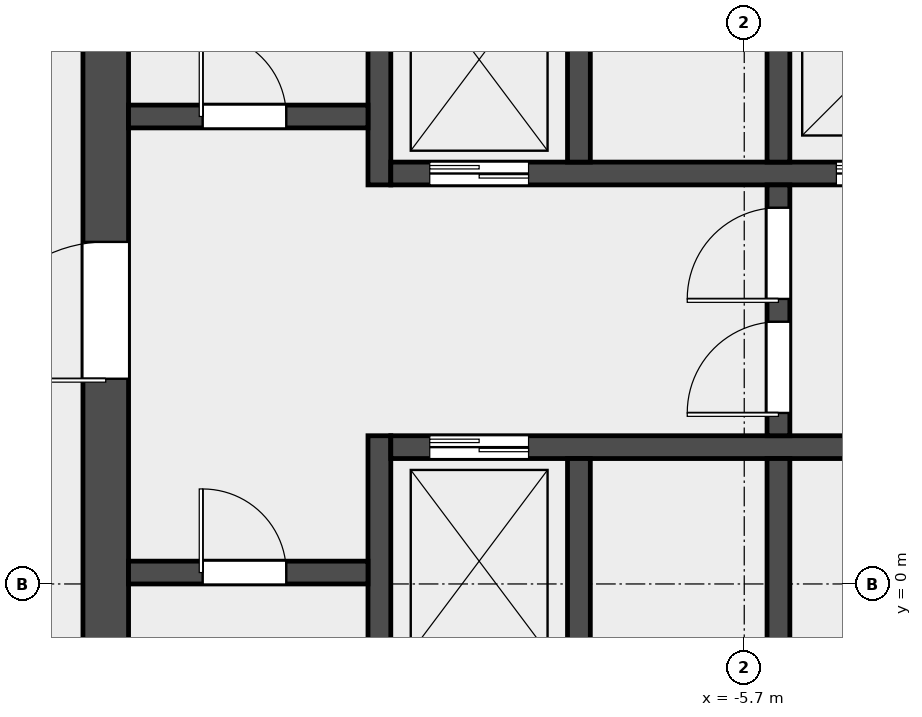
"""IFC4 building model, lengths in metres.
Left out: names, types, materials, properties, quantities, classifications, styles, units other than length and angle.
Written with IfcOpenShell. Run it as: python <this file> out.ifc"""

import sys

from ifc_helpers import new_model, si_unit, direction, frame, frame_2d, origin, place, context, subcontext, project, spatial, rectangle, extrude, element, fill, save


model = new_model("IFC4")
c1 = context("Model", 3, precision=1e-05, world=origin(), true_north=direction((0.0, 1.0)))
c2 = subcontext(c1, "Body", "Model", "MODEL_VIEW")
j1 = project(units=[si_unit("LENGTHUNIT", "METRE"), si_unit("PLANEANGLEUNIT", "RADIAN")], contexts=[c1])
p1 = place(None, origin())
s1 = spatial("IfcSite", under=j1, at=p1, CompositionType="ELEMENT")
p2 = place(p1, origin())
s2 = spatial("IfcBuilding", under=s1, at=p2, CompositionType="ELEMENT")
p3 = place(p2, frame((0.0, 0.0, 219.0)))
s3 = spatial("IfcBuildingStorey", under=s2, at=p3, CompositionType="ELEMENT", Elevation=219.0)
p4 = place(p3, frame((-14.1, -6.6, 0.0), z_axis=(0.0, 0.0, 1.0), x_axis=(0.0, 1.0, 0.0)))
e1 = element("IfcWall", 1, at=p4, inside=s3, PredefinedType="SHEAR", context=c2, shape_type="SweptSolid", body=[
    extrude(rectangle(XDim=19.5, YDim=0.6, at=frame_2d((9.75, 0.0))), origin(), (0.0, 0.0, 1.0), 3.7),
])
p5 = place(p4, frame((9.3, 0.0, 0.0)))
e2 = element("IfcOpeningElement", 2, at=p5, cuts=e1, PredefinedType="OPENING", context=c2, shape_type="SweptSolid", body=[
    extrude(rectangle(XDim=1.8, YDim=2.1, at=frame_2d((0.9, 1.05))), frame((0.0, 0.312, 0.0), z_axis=(0.0, -1.0, 0.0), x_axis=(1.0, 0.0, 0.0)), (0.0, 0.0, 1.0), 0.624),
])
p6 = place(p3, frame((-10.5, -6.6, 0.0), z_axis=(0.0, 0.0, 1.0), x_axis=(0.0, 1.0, 0.0)))
e3 = element("IfcWall", 3, at=p6, inside=s3, PredefinedType="SHEAR", context=c2, shape_type="SweptSolid", body=[
    extrude(rectangle(XDim=8.55, YDim=0.3, at=frame_2d((4.275, 0.0))), origin(), (0.0, 0.0, 1.0), 3.7),
])
p7 = place(p3, frame((-10.5, 5.25, 0.0), z_axis=(0.0, 0.0, 1.0), x_axis=(0.0, 1.0, 0.0)))
e4 = element("IfcWall", 4, at=p7, inside=s3, PredefinedType="SHEAR", context=c2, shape_type="SweptSolid", body=[
    extrude(rectangle(XDim=7.65, YDim=0.3, at=frame_2d((3.825, 0.0))), origin(), (0.0, 0.0, 1.0), 3.7),
])
p8 = place(p3, frame((-13.8, 0.15, 0.0), z_axis=(0.0, 0.0, 1.0), x_axis=(1.0, 0.0, 0.0)))
e5 = element("IfcWall", 5, at=p8, inside=s3, PredefinedType="SOLIDWALL", context=c2, shape_type="SweptSolid", body=[
    extrude(rectangle(XDim=3.15, YDim=0.3, at=frame_2d((1.575, 0.0))), origin(), (0.0, 0.0, 1.0), 3.7),
])
p9 = place(p8, frame((0.975, 0.0, 0.0)))
e6 = element("IfcOpeningElement", 6, at=p9, cuts=e5, PredefinedType="OPENING", context=c2, shape_type="SweptSolid", body=[
    extrude(rectangle(XDim=1.1, YDim=2.1, at=frame_2d((0.55, 1.05))), frame((0.0, 0.162, 0.0), z_axis=(0.0, -1.0, 0.0), x_axis=(1.0, 0.0, 0.0)), (0.0, 0.0, 1.0), 0.324),
])
p10 = place(p3, frame((-13.8, 6.15, 0.0), z_axis=(0.0, 0.0, 1.0), x_axis=(1.0, 0.0, 0.0)))
e7 = element("IfcWall", 7, at=p10, inside=s3, PredefinedType="SOLIDWALL", context=c2, shape_type="SweptSolid", body=[
    extrude(rectangle(XDim=3.15, YDim=0.3, at=frame_2d((1.575, 0.0))), origin(), (0.0, 0.0, 1.0), 3.7),
])
p11 = place(p10, frame((0.975, 0.0, 0.0)))
e8 = element("IfcOpeningElement", 8, at=p11, cuts=e7, PredefinedType="OPENING", context=c2, shape_type="SweptSolid", body=[
    extrude(rectangle(XDim=1.1, YDim=2.1, at=frame_2d((0.55, 1.05))), frame((0.0, 0.162, 0.0), z_axis=(0.0, -1.0, 0.0), x_axis=(1.0, 0.0, 0.0)), (0.0, 0.0, 1.0), 0.324),
])
p12 = place(p3, frame((-10.35, 1.8, 0.0), z_axis=(0.0, 0.0, 1.0), x_axis=(1.0, 0.0, 0.0)))
e9 = element("IfcWall", 9, at=p12, inside=s3, PredefinedType="SOLIDWALL", context=c2, shape_type="SweptSolid", body=[
    extrude(rectangle(XDim=20.7, YDim=0.3, at=frame_2d((10.35, 0.0))), origin(), (0.0, 0.0, 1.0), 3.7),
])
p13 = place(p12, frame((0.512, 0.0, 0.0)))
e10 = element("IfcOpeningElement", 10, at=p13, cuts=e9, PredefinedType="OPENING", context=c2, shape_type="SweptSolid", body=[
    extrude(rectangle(XDim=1.3, YDim=2.1, at=frame_2d((0.65, 1.05))), frame((0.0, 0.162, 0.0), z_axis=(0.0, -1.0, 0.0), x_axis=(1.0, 0.0, 0.0)), (0.0, 0.0, 1.0), 0.324),
])
p14 = place(p12, frame((7.225, 0.0, 0.0)))
e11 = element("IfcOpeningElement", 11, at=p14, cuts=e9, PredefinedType="OPENING", context=c2, shape_type="SweptSolid", body=[
    extrude(rectangle(XDim=1.0, YDim=2.1, at=frame_2d((0.5, 1.05))), frame((0.0, 0.162, 0.0), z_axis=(0.0, -1.0, 0.0), x_axis=(1.0, 0.0, 0.0)), (0.0, 0.0, 1.0), 0.324),
])
p15 = place(p12, frame((12.475, 0.0, 0.0)))
e12 = element("IfcOpeningElement", 12, at=p15, cuts=e9, PredefinedType="OPENING", context=c2, shape_type="SweptSolid", body=[
    extrude(rectangle(XDim=1.0, YDim=2.1, at=frame_2d((0.5, 1.05))), frame((0.0, 0.162, 0.0), z_axis=(0.0, -1.0, 0.0), x_axis=(1.0, 0.0, 0.0)), (0.0, 0.0, 1.0), 0.324),
])
p16 = place(p12, frame((16.413, 0.0, 0.0)))
e13 = element("IfcOpeningElement", 13, at=p16, cuts=e9, PredefinedType="OPENING", context=c2, shape_type="SweptSolid", body=[
    extrude(rectangle(XDim=1.0, YDim=2.1, at=frame_2d((0.5, 1.05))), frame((0.0, 0.162, 0.0), z_axis=(0.0, -1.0, 0.0), x_axis=(1.0, 0.0, 0.0)), (0.0, 0.0, 1.0), 0.324),
])
p17 = place(p12, frame((19.038, 0.0, 0.0)))
e14 = element("IfcOpeningElement", 14, at=p17, cuts=e9, PredefinedType="OPENING", context=c2, shape_type="SweptSolid", body=[
    extrude(rectangle(XDim=1.0, YDim=2.1, at=frame_2d((0.5, 1.05))), frame((0.0, 0.162, 0.0), z_axis=(0.0, -1.0, 0.0), x_axis=(1.0, 0.0, 0.0)), (0.0, 0.0, 1.0), 0.324),
])
p18 = place(p3, frame((-10.35, 5.4, 0.0), z_axis=(0.0, 0.0, 1.0), x_axis=(1.0, 0.0, 0.0)))
e15 = element("IfcWall", 15, at=p18, inside=s3, PredefinedType="SOLIDWALL", context=c2, shape_type="SweptSolid", body=[
    extrude(rectangle(XDim=20.7, YDim=0.3, at=frame_2d((10.35, 0.0))), origin(), (0.0, 0.0, 1.0), 3.7),
])
p19 = place(p18, frame((0.512, 0.0, 0.0)))
e16 = element("IfcOpeningElement", 16, at=p19, cuts=e15, PredefinedType="OPENING", context=c2, shape_type="SweptSolid", body=[
    extrude(rectangle(XDim=1.3, YDim=2.1, at=frame_2d((0.65, 1.05))), frame((0.0, 0.162, 0.0), z_axis=(0.0, -1.0, 0.0), x_axis=(1.0, 0.0, 0.0)), (0.0, 0.0, 1.0), 0.324),
])
p20 = place(p18, frame((5.863, 0.0, 0.0)))
e17 = element("IfcOpeningElement", 17, at=p20, cuts=e15, PredefinedType="OPENING", context=c2, shape_type="SweptSolid", body=[
    extrude(rectangle(XDim=1.1, YDim=2.1, at=frame_2d((0.55, 1.05))), frame((0.0, 0.162, 0.0), z_axis=(0.0, -1.0, 0.0), x_axis=(1.0, 0.0, 0.0)), (0.0, 0.0, 1.0), 0.324),
])
p21 = place(p18, frame((8.488, 0.0, 0.0)))
e18 = element("IfcOpeningElement", 18, at=p21, cuts=e15, PredefinedType="OPENING", context=c2, shape_type="SweptSolid", body=[
    extrude(rectangle(XDim=1.1, YDim=2.1, at=frame_2d((0.55, 1.05))), frame((0.0, 0.162, 0.0), z_axis=(0.0, -1.0, 0.0), x_axis=(1.0, 0.0, 0.0)), (0.0, 0.0, 1.0), 0.324),
])
p22 = place(p18, frame((11.113, 0.0, 0.0)))
e19 = element("IfcOpeningElement", 19, at=p22, cuts=e15, PredefinedType="OPENING", context=c2, shape_type="SweptSolid", body=[
    extrude(rectangle(XDim=1.1, YDim=2.1, at=frame_2d((0.55, 1.05))), frame((0.0, 0.162, 0.0), z_axis=(0.0, -1.0, 0.0), x_axis=(1.0, 0.0, 0.0)), (0.0, 0.0, 1.0), 0.324),
])
p23 = place(p18, frame((13.738, 0.0, 0.0)))
e20 = element("IfcOpeningElement", 20, at=p23, cuts=e15, PredefinedType="OPENING", context=c2, shape_type="SweptSolid", body=[
    extrude(rectangle(XDim=1.1, YDim=2.1, at=frame_2d((0.55, 1.05))), frame((0.0, 0.162, 0.0), z_axis=(0.0, -1.0, 0.0), x_axis=(1.0, 0.0, 0.0)), (0.0, 0.0, 1.0), 0.324),
])
p24 = place(p18, frame((16.363, 0.0, 0.0)))
e21 = element("IfcOpeningElement", 21, at=p24, cuts=e15, PredefinedType="OPENING", context=c2, shape_type="SweptSolid", body=[
    extrude(rectangle(XDim=1.1, YDim=2.1, at=frame_2d((0.55, 1.05))), frame((0.0, 0.162, 0.0), z_axis=(0.0, -1.0, 0.0), x_axis=(1.0, 0.0, 0.0)), (0.0, 0.0, 1.0), 0.324),
])
p25 = place(p18, frame((18.988, 0.0, 0.0)))
e22 = element("IfcOpeningElement", 22, at=p25, cuts=e15, PredefinedType="OPENING", context=c2, shape_type="SweptSolid", body=[
    extrude(rectangle(XDim=1.1, YDim=2.1, at=frame_2d((0.55, 1.05))), frame((0.0, 0.162, 0.0), z_axis=(0.0, -1.0, 0.0), x_axis=(1.0, 0.0, 0.0)), (0.0, 0.0, 1.0), 0.324),
])
for number, where, z_axis, x_axis in (
    (23, (-7.875, -1.05, 0.0), (0.0, 0.0, 1.0), (0.0, 1.0, 0.0)),
    (24, (-5.25, -1.05, 0.0), (0.0, 0.0, 1.0), (0.0, 1.0, 0.0)),
    (25, (-7.875, 5.55, 0.0), (0.0, 0.0, 1.0), (0.0, 1.0, 0.0)),
    (26, (-5.25, 5.55, 0.0), (0.0, 0.0, 1.0), (0.0, 1.0, 0.0)),
):
    element("IfcWall", number, at=place(p3, frame(where, z_axis=z_axis, x_axis=x_axis)), inside=s3, PredefinedType="SOLIDWALL", context=c2, shape_type="SweptSolid", body=[
        extrude(rectangle(XDim=2.7, YDim=0.3, at=frame_2d((1.35, 0.0))), origin(), (0.0, 0.0, 1.0), 3.7),
    ])
p26 = place(p3, frame((-5.25, 1.95, 0.0), z_axis=(0.0, 0.0, 1.0), x_axis=(0.0, 1.0, 0.0)))
e27 = element("IfcWall", 27, at=p26, inside=s3, PredefinedType="SOLIDWALL", context=c2, shape_type="SweptSolid", body=[
    extrude(rectangle(XDim=3.3, YDim=0.3, at=frame_2d((1.65, 0.0))), origin(), (0.0, 0.0, 1.0), 3.7),
])
p27 = place(p26, frame((0.3, 0.0, 0.0)))
e28 = element("IfcOpeningElement", 28, at=p27, cuts=e27, PredefinedType="OPENING", context=c2, shape_type="SweptSolid", body=[
    extrude(rectangle(XDim=1.2, YDim=2.1, at=frame_2d((0.6, 1.05))), frame((0.0, 0.162, 0.0), z_axis=(0.0, -1.0, 0.0), x_axis=(1.0, 0.0, 0.0)), (0.0, 0.0, 1.0), 0.324),
])
p28 = place(p26, frame((1.8, 0.0, 0.0)))
e29 = element("IfcOpeningElement", 29, at=p28, cuts=e27, PredefinedType="OPENING", context=c2, shape_type="SweptSolid", body=[
    extrude(rectangle(XDim=1.2, YDim=2.1, at=frame_2d((0.6, 1.05))), frame((0.0, 0.162, 0.0), z_axis=(0.0, -1.0, 0.0), x_axis=(1.0, 0.0, 0.0)), (0.0, 0.0, 1.0), 0.324),
])
p29 = place(p9, origin())
e30 = element("IfcDoor", 30, at=p29, inside=s3, OperationType="SINGLE_SWING_LEFT", PredefinedType="DOOR", context=c2, shape_type="SweptSolid", body=[
    extrude(rectangle(XDim=1.1, YDim=2.1, at=frame_2d((0.55, 1.05))), frame((0.0, 0.025, 0.0), z_axis=(0.0, -1.0, 0.0), x_axis=(1.0, 0.0, 0.0)), (0.0, 0.0, 1.0), 0.05),
])
fill(e6, e30)
p30 = place(p11, origin())
e31 = element("IfcDoor", 31, at=p30, inside=s3, OperationType="SINGLE_SWING_LEFT", PredefinedType="DOOR", context=c2, shape_type="SweptSolid", body=[
    extrude(rectangle(XDim=1.1, YDim=2.1, at=frame_2d((0.55, 1.05))), frame((0.0, 0.025, 0.0), z_axis=(0.0, -1.0, 0.0), x_axis=(1.0, 0.0, 0.0)), (0.0, 0.0, 1.0), 0.05),
])
fill(e8, e31)
p31 = place(p5, origin())
e32 = element("IfcDoor", 32, at=p31, inside=s3, OperationType="DOUBLE_DOOR_SINGLE_SWING", PredefinedType="DOOR", context=c2, shape_type="SweptSolid", body=[
    extrude(rectangle(XDim=1.8, YDim=2.1, at=frame_2d((0.9, 1.05))), frame((0.0, 0.025, 0.0), z_axis=(0.0, -1.0, 0.0), x_axis=(1.0, 0.0, 0.0)), (0.0, 0.0, 1.0), 0.05),
])
fill(e2, e32)
p32 = place(p27, origin())
e33 = element("IfcDoor", 33, at=p32, inside=s3, OperationType="SINGLE_SWING_LEFT", PredefinedType="DOOR", context=c2, shape_type="SweptSolid", body=[
    extrude(rectangle(XDim=1.2, YDim=2.1, at=frame_2d((0.6, 1.05))), frame((0.0, 0.025, 0.0), z_axis=(0.0, -1.0, 0.0), x_axis=(1.0, 0.0, 0.0)), (0.0, 0.0, 1.0), 0.05),
])
fill(e28, e33)
p33 = place(p28, origin())
e34 = element("IfcDoor", 34, at=p33, inside=s3, OperationType="SINGLE_SWING_RIGHT", PredefinedType="DOOR", context=c2, shape_type="SweptSolid", body=[
    extrude(rectangle(XDim=1.2, YDim=2.1, at=frame_2d((0.6, 1.05))), frame((0.0, 0.025, 0.0), z_axis=(0.0, -1.0, 0.0), x_axis=(1.0, 0.0, 0.0)), (0.0, 0.0, 1.0), 0.05),
])
fill(e29, e34)
p34 = place(p13, origin())
e35 = element("IfcDoor", 35, at=p34, inside=s3, OperationType="DOUBLE_DOOR_SLIDING", PredefinedType="DOOR", context=c2, shape_type="SweptSolid", body=[
    extrude(rectangle(XDim=1.3, YDim=2.1, at=frame_2d((0.65, 1.05))), frame((0.0, 0.025, 0.0), z_axis=(0.0, -1.0, 0.0), x_axis=(1.0, 0.0, 0.0)), (0.0, 0.0, 1.0), 0.05),
])
fill(e10, e35)
p35 = place(p19, origin())
e36 = element("IfcDoor", 36, at=p35, inside=s3, OperationType="DOUBLE_DOOR_SLIDING", PredefinedType="DOOR", context=c2, shape_type="SweptSolid", body=[
    extrude(rectangle(XDim=1.3, YDim=2.1, at=frame_2d((0.65, 1.05))), frame((0.0, 0.025, 0.0), z_axis=(0.0, -1.0, 0.0), x_axis=(1.0, 0.0, 0.0)), (0.0, 0.0, 1.0), 0.05),
])
fill(e16, e36)
p36 = place(p20, origin())
e37 = element("IfcDoor", 37, at=p36, inside=s3, OperationType="DOUBLE_DOOR_SLIDING", PredefinedType="DOOR", context=c2, shape_type="SweptSolid", body=[
    extrude(rectangle(XDim=1.1, YDim=2.1, at=frame_2d((0.55, 1.05))), frame((0.0, 0.025, 0.0), z_axis=(0.0, -1.0, 0.0), x_axis=(1.0, 0.0, 0.0)), (0.0, 0.0, 1.0), 0.05),
])
fill(e17, e37)
save(model, sys.argv[1])
